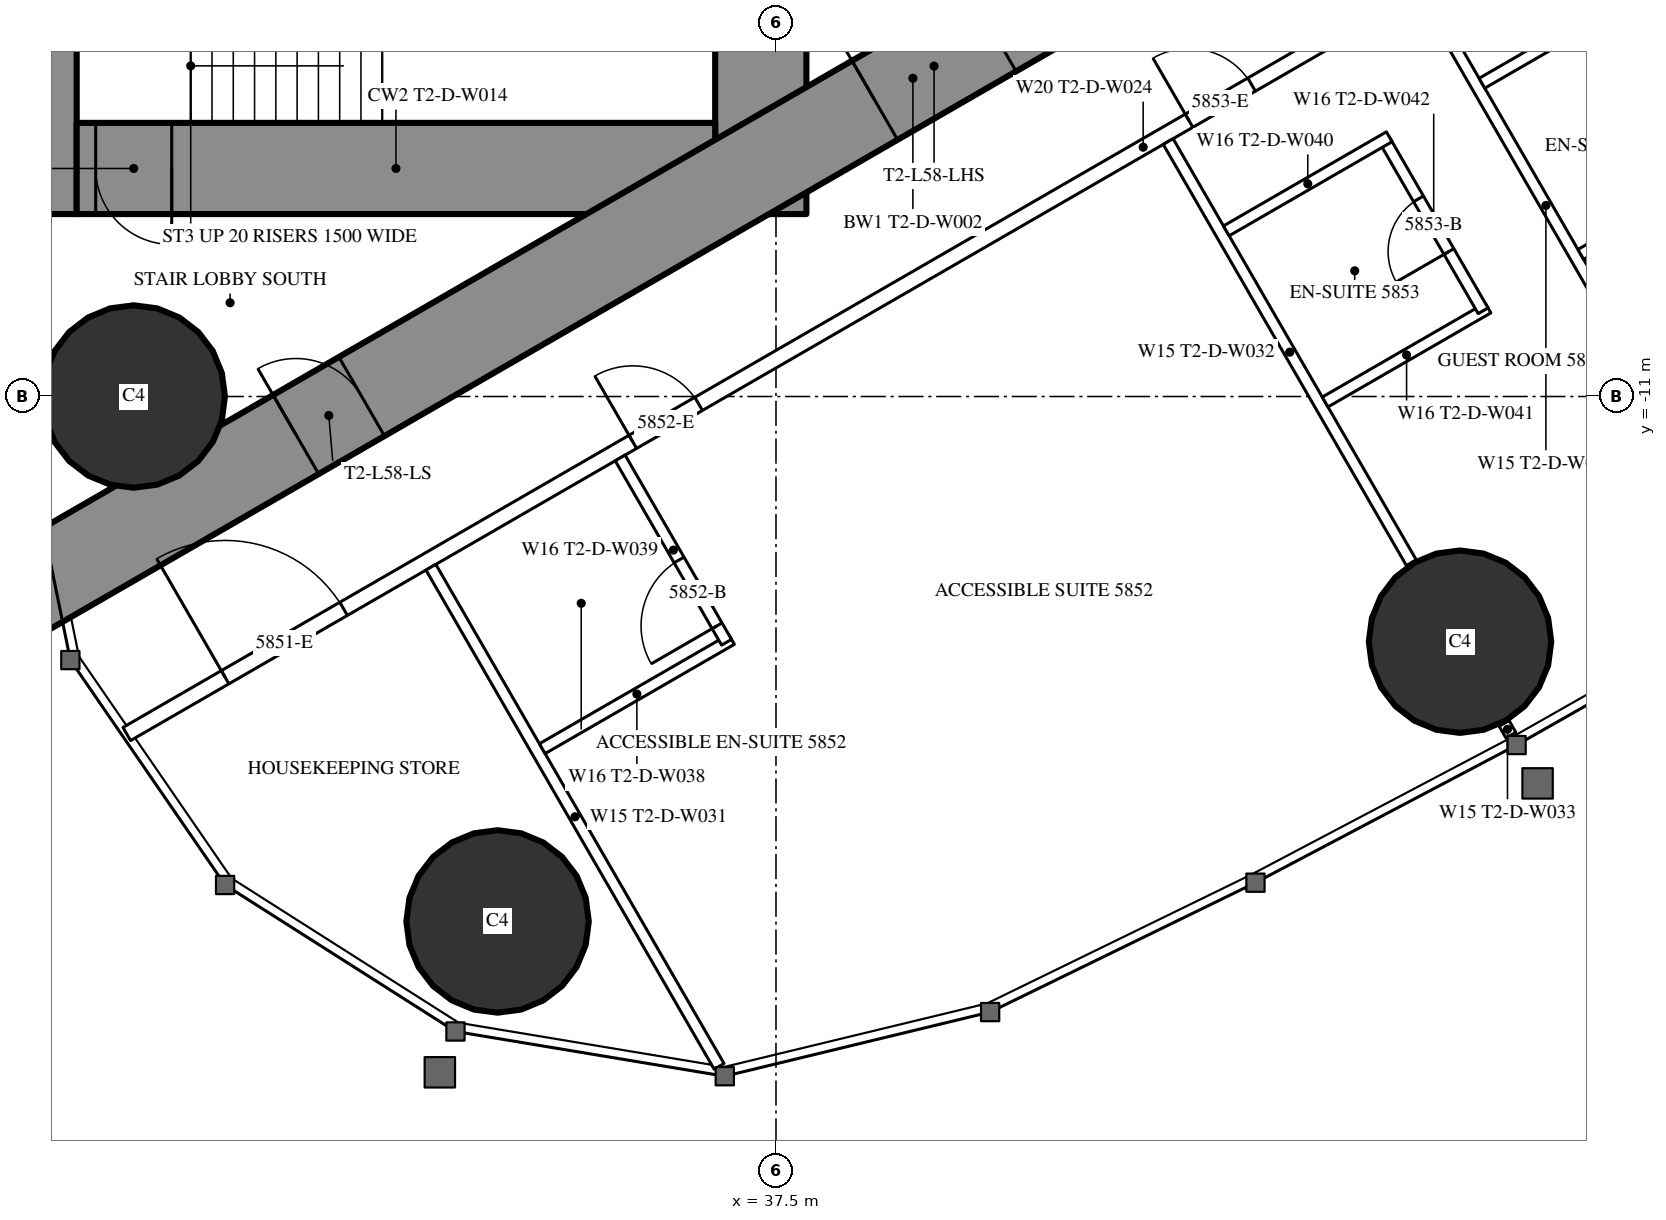
"""IFC4 building model, lengths in metres.
Left out: names, types, materials, properties, quantities, classifications, styles, units other than length and angle.
Written with IfcOpenShell. Run it as: python <this file> out.ifc"""

import sys

from ifc_helpers import new_model, si_unit, direction, frame, frame_2d, origin, origin_2d, place, context, subcontext, project, spatial, rectangle, circle, extrude, element, fill, save


model = new_model("IFC4")
c1 = context("Model", 3, precision=1e-05, world=origin(), true_north=direction((0.0, 1.0)))
c2 = subcontext(c1, "Body", "Model", "MODEL_VIEW")
j1 = project(units=[si_unit("LENGTHUNIT", "METRE"), si_unit("PLANEANGLEUNIT", "RADIAN")], contexts=[c1])
p1 = place(None, origin())
s1 = spatial("IfcSite", under=j1, at=p1, CompositionType="ELEMENT")
p2 = place(p1, origin())
s2 = spatial("IfcBuilding", under=s1, at=p2, CompositionType="ELEMENT")
p3 = place(p2, frame((0.0, 0.0, 218.9)))
s3 = spatial("IfcBuildingStorey", under=s2, at=p3, CompositionType="ELEMENT", Elevation=218.9)
for number, where, z_axis, x_axis in (
    (1, (33.837, -17.906, 0.0), (0.0, 0.0, 1.0), (1.0, 0.0, 0.0)),
    (2, (29.05, -11.0, 0.0), (0.0, 0.0, 1.0), (1.0, 0.0, 0.0)),
    (3, (46.499, -14.226, 0.0), (0.0, 0.0, 1.0), (1.0, 0.0, 0.0)),
):
    element("IfcColumn", number, at=place(p3, frame(where, z_axis=z_axis, x_axis=x_axis)), inside=s3, PredefinedType="COLUMN", context=c2, shape_type="SweptSolid", body=[
        extrude(circle(Radius=1.2, at=origin_2d()), origin(), (0.0, 0.0, 1.0), 3.6),
    ])
p4 = place(p3, frame((27.9, -8.6, 0.0), z_axis=(0.0, 0.0, 1.0), x_axis=(0.0, 1.0, 0.0)))
e4 = element("IfcWall", 4, at=p4, inside=s3, PredefinedType="SHEAR", context=c2, shape_type="SweptSolid", body=[
    extrude(rectangle(XDim=17.2, YDim=0.8, at=frame_2d((8.6, 0.0))), origin(), (0.0, 0.0, 1.0), 3.6),
])
p5 = place(p4, frame((9.35, 0.0, 0.0)))
e5 = element("IfcOpeningElement", 5, at=p5, cuts=e4, PredefinedType="OPENING", context=c2, shape_type="SweptSolid", body=[
    extrude(rectangle(XDim=0.9, YDim=2.2, at=frame_2d((0.45, 1.1))), frame((0.0, 0.41, 0.0), z_axis=(0.0, -1.0, 0.0), x_axis=(1.0, 0.0, 0.0)), (0.0, 0.0, 1.0), 0.82),
])
p6 = place(p3, frame((37.3, -8.6, 0.0), z_axis=(0.0, 0.0, 1.0), x_axis=(0.0, 1.0, 0.0)))
e6 = element("IfcWall", 6, at=p6, inside=s3, PredefinedType="SHEAR", context=c2, shape_type="SweptSolid", body=[
    extrude(rectangle(XDim=17.2, YDim=1.2, at=frame_2d((8.6, 0.0))), origin(), (0.0, 0.0, 1.0), 3.6),
])
p7 = place(p6, frame((7.7, 0.0, 0.0)))
e7 = element("IfcOpeningElement", 7, at=p7, cuts=e6, PredefinedType="OPENING", context=c2, shape_type="SweptSolid", body=[
    extrude(rectangle(XDim=1.8, YDim=2.2, at=frame_2d((0.9, 1.1))), frame((0.0, 0.61, 0.0), z_axis=(0.0, -1.0, 0.0), x_axis=(1.0, 0.0, 0.0)), (0.0, 0.0, 1.0), 1.22),
])
p8 = place(p3, frame((28.3, -8.0, 0.0), z_axis=(0.0, 0.0, 1.0), x_axis=(1.0, 0.0, 0.0)))
e8 = element("IfcWall", 8, at=p8, inside=s3, PredefinedType="SHEAR", context=c2, shape_type="SweptSolid", body=[
    extrude(rectangle(XDim=8.4, YDim=1.2, at=frame_2d((4.2, 0.0))), origin(), (0.0, 0.0, 1.0), 3.6),
])
p9 = place(p8, frame((0.25, 0.0, 0.0)))
e9 = element("IfcOpeningElement", 9, at=p9, cuts=e8, PredefinedType="OPENING", context=c2, shape_type="SweptSolid", body=[
    extrude(rectangle(XDim=1.0, YDim=2.2, at=frame_2d((0.5, 1.1))), frame((0.0, 0.61, 0.0), z_axis=(0.0, -1.0, 0.0), x_axis=(1.0, 0.0, 0.0)), (0.0, 0.0, 1.0), 1.22),
])
p10 = place(p3, frame((27.2, -13.8, 0.0), z_axis=(0.0, 0.0, 1.0), x_axis=(0.866027159892, 0.499996958321, 0.0)))
e10 = element("IfcWall", 10, at=p10, inside=s3, PredefinedType="SHEAR", context=c2, shape_type="SweptSolid", body=[
    extrude(rectangle(XDim=27.947, YDim=1.2, at=frame_2d((13.973, 0.0))), origin(), (0.0, 0.0, 1.0), 3.6),
])
p11 = place(p10, frame((4.6, 0.0, 0.0)))
e11 = element("IfcOpeningElement", 11, at=p11, cuts=e10, PredefinedType="OPENING", context=c2, shape_type="SweptSolid", body=[
    extrude(rectangle(XDim=1.0, YDim=2.2, at=frame_2d((0.5, 1.1))), frame((0.0, 0.61, 0.0), z_axis=(0.0, -1.0, 0.0), x_axis=(1.0, 0.0, 0.0)), (0.0, 0.0, 1.0), 1.22),
])
p12 = place(p10, frame((13.395, 0.0, 0.0)))
e12 = element("IfcOpeningElement", 12, at=p12, cuts=e10, PredefinedType="OPENING", context=c2, shape_type="SweptSolid", body=[
    extrude(rectangle(XDim=1.8, YDim=2.2, at=frame_2d((0.9, 1.1))), frame((0.0, 0.61, 0.0), z_axis=(0.0, -1.0, 0.0), x_axis=(1.0, 0.0, 0.0)), (0.0, 0.0, 1.0), 1.22),
])
p13 = place(p3, frame((28.959, -15.44, 0.0), z_axis=(0.0, 0.0, 1.0), x_axis=(0.866025227435, 0.500000305447, 0.0)))
e13 = element("IfcWall", 13, at=p13, inside=s3, PredefinedType="PARTITIONING", context=c2, shape_type="SweptSolid", body=[
    extrude(rectangle(XDim=30.88, YDim=0.2, at=frame_2d((15.44, 0.0))), origin(), (0.0, 0.0, 1.0), 3.35),
])
p14 = place(p13, frame((1.494, 0.0, 0.0)))
e14 = element("IfcOpeningElement", 14, at=p14, cuts=e13, PredefinedType="OPENING", context=c2, shape_type="SweptSolid", body=[
    extrude(rectangle(XDim=1.8, YDim=2.03, at=frame_2d((0.9, 1.015))), frame((0.0, 0.11, 0.0), z_axis=(0.0, -1.0, 0.0), x_axis=(1.0, 0.0, 0.0)), (0.0, 0.0, 1.0), 0.22),
])
p15 = place(p13, frame((7.687, 0.0, 0.0)))
e15 = element("IfcOpeningElement", 15, at=p15, cuts=e13, PredefinedType="OPENING", context=c2, shape_type="SweptSolid", body=[
    extrude(rectangle(XDim=1.0, YDim=2.2, at=frame_2d((0.5, 1.1))), frame((0.0, 0.11, 0.0), z_axis=(0.0, -1.0, 0.0), x_axis=(1.0, 0.0, 0.0)), (0.0, 0.0, 1.0), 0.22),
])
p16 = place(p13, frame((16.137, 0.0, 0.0)))
e16 = element("IfcOpeningElement", 16, at=p16, cuts=e13, PredefinedType="OPENING", context=c2, shape_type="SweptSolid", body=[
    extrude(rectangle(XDim=0.95, YDim=2.2, at=frame_2d((0.475, 1.1))), frame((0.0, 0.11, 0.0), z_axis=(0.0, -1.0, 0.0), x_axis=(1.0, 0.0, 0.0)), (0.0, 0.0, 1.0), 0.22),
])
p17 = place(p13, frame((20.021, 0.0, 0.0)))
e17 = element("IfcOpeningElement", 17, at=p17, cuts=e13, PredefinedType="OPENING", context=c2, shape_type="SweptSolid", body=[
    extrude(rectangle(XDim=0.95, YDim=2.2, at=frame_2d((0.475, 1.1))), frame((0.0, 0.11, 0.0), z_axis=(0.0, -1.0, 0.0), x_axis=(1.0, 0.0, 0.0)), (0.0, 0.0, 1.0), 0.22),
])
p18 = place(p13, frame((26.253, 0.0, 0.0)))
e18 = element("IfcOpeningElement", 18, at=p18, cuts=e13, PredefinedType="OPENING", context=c2, shape_type="SweptSolid", body=[
    extrude(rectangle(XDim=0.95, YDim=2.2, at=frame_2d((0.475, 1.1))), frame((0.0, 0.11, 0.0), z_axis=(0.0, -1.0, 0.0), x_axis=(1.0, 0.0, 0.0)), (0.0, 0.0, 1.0), 0.22),
])
p19 = place(p3, frame((32.96, -13.246, 0.0), z_axis=(0.0, 0.0, 1.0), x_axis=(0.500000236886, -0.866025267018, 0.0)))
e19 = element("IfcWall", 19, at=p19, inside=s3, PredefinedType="PARTITIONING", context=c2, shape_type="SweptSolid", body=[
    extrude(rectangle(XDim=7.583, YDim=0.15, at=frame_2d((3.791, 0.0))), origin(), (0.0, 0.0, 1.0), 3.35),
])
p20 = place(p3, frame((42.66, -7.646, 0.0), z_axis=(0.0, 0.0, 1.0), x_axis=(0.499996592859, -0.866027370889, 0.0)))
e20 = element("IfcWall", 20, at=p20, inside=s3, PredefinedType="PARTITIONING", context=c2, shape_type="SweptSolid", body=[
    extrude(rectangle(XDim=6.398, YDim=0.15, at=frame_2d((3.199, 0.0))), origin(), (0.0, 0.0, 1.0), 2.45),
])
p21 = place(p3, frame((47.079, -15.3, 0.0), z_axis=(0.0, 0.0, 1.0), x_axis=(0.499212083968, -0.866479829667, 0.0)))
e21 = element("IfcWall", 21, at=p21, inside=s3, PredefinedType="PARTITIONING", context=c2, shape_type="SweptSolid", body=[
    extrude(rectangle(XDim=0.179, YDim=0.15, at=frame_2d((0.09, 0.0))), origin(), (0.0, 0.0, 1.0), 2.45),
])
p22 = place(p3, frame((46.023, -5.704, 0.0), z_axis=(0.0, 0.0, 1.0), x_axis=(0.499984478165, -0.866034365135, 0.0)))
e22 = element("IfcWall", 22, at=p22, inside=s3, PredefinedType="PARTITIONING", context=c2, shape_type="SweptSolid", body=[
    extrude(rectangle(XDim=6.426, YDim=0.15, at=frame_2d((3.213, 0.0))), origin(), (0.0, 0.0, 1.0), 2.45),
])
p23 = place(p3, frame((34.425, -15.633, 0.0), z_axis=(0.0, 0.0, 1.0), x_axis=(0.866018712932, 0.500011588718, 0.0)))
e23 = element("IfcWall", 23, at=p23, inside=s3, PredefinedType="PARTITIONING", context=c2, shape_type="SweptSolid", body=[
    extrude(rectangle(XDim=2.875, YDim=0.15, at=frame_2d((1.438, 0.0))), origin(), (0.0, 0.0, 1.0), 3.35),
])
p24 = place(p3, frame((35.45, -11.808, 0.0), z_axis=(0.0, 0.0, 1.0), x_axis=(0.49994636267, -0.866056369097, 0.0)))
e24 = element("IfcWall", 24, at=p24, inside=s3, PredefinedType="PARTITIONING", context=c2, shape_type="SweptSolid", body=[
    extrude(rectangle(XDim=2.8, YDim=0.15, at=frame_2d((1.4, 0.0))), origin(), (0.0, 0.0, 1.0), 3.35),
])
p25 = place(p24, frame((1.55, 0.0, 0.0)))
e25 = element("IfcOpeningElement", 25, at=p25, cuts=e24, PredefinedType="OPENING", context=c2, shape_type="SweptSolid", body=[
    extrude(rectangle(XDim=1.0, YDim=2.2, at=frame_2d((0.5, 1.1))), frame((0.0, 0.085, 0.0), z_axis=(0.0, -1.0, 0.0), x_axis=(1.0, 0.0, 0.0)), (0.0, 0.0, 1.0), 0.17),
])
p26 = place(p3, frame((44.725, -11.072, 0.0), z_axis=(0.0, 0.0, 1.0), x_axis=(0.866006523861, 0.500032699561, 0.0)))
e26 = element("IfcWall", 26, at=p26, inside=s3, PredefinedType="PARTITIONING", context=c2, shape_type="SweptSolid", body=[
    extrude(rectangle(XDim=2.475, YDim=0.15, at=frame_2d((1.237, 0.0))), origin(), (0.0, 0.0, 1.0), 3.35),
])
p27 = place(p3, frame((45.503, -7.621, 0.0), z_axis=(0.0, 0.0, 1.0), x_axis=(0.500006934395, -0.866021400173, 0.0)))
e27 = element("IfcWall", 27, at=p27, inside=s3, PredefinedType="PARTITIONING", context=c2, shape_type="SweptSolid", body=[
    extrude(rectangle(XDim=2.6, YDim=0.15, at=frame_2d((1.3, 0.0))), origin(), (0.0, 0.0, 1.0), 3.35),
])
p28 = place(p27, frame((0.9, 0.0, 0.0)))
e28 = element("IfcOpeningElement", 28, at=p28, cuts=e27, PredefinedType="OPENING", context=c2, shape_type="SweptSolid", body=[
    extrude(rectangle(XDim=0.8, YDim=2.2, at=frame_2d((0.4, 1.1))), frame((0.0, 0.085, 0.0), z_axis=(0.0, -1.0, 0.0), x_axis=(1.0, 0.0, 0.0)), (0.0, 0.0, 1.0), 0.17),
])
for number, where, z_axis, x_axis in (
    (29, (43.425, -8.821, 0.0), (0.0, 0.0, 1.0), (0.866, 0.5, 0.0)),
    (30, (48.088, -9.13, 0.0), (0.0, 0.0, 1.0), (0.866, 0.5, 0.0)),
    (31, (46.788, -6.879, 0.0), (0.0, 0.0, 1.0), (0.866, 0.5, 0.0)),
):
    element("IfcWall", number, at=place(p3, frame(where, z_axis=z_axis, x_axis=x_axis)), inside=s3, PredefinedType="PARTITIONING", context=c2, shape_type="SweptSolid", body=[
        extrude(rectangle(XDim=2.475, YDim=0.15, at=frame_2d((1.237, 0.0))), origin(), (0.0, 0.0, 1.0), 3.35),
    ])
p29 = place(p14, origin())
e32 = element("IfcDoor", 32, at=p29, inside=s3, OperationType="DOUBLE_DOOR_SINGLE_SWING", PredefinedType="DOOR", context=c2, shape_type="SweptSolid", body=[
    extrude(rectangle(XDim=1.8, YDim=2.03, at=frame_2d((0.9, 1.015))), frame((0.0, 0.025, 0.0), z_axis=(0.0, -1.0, 0.0), x_axis=(1.0, 0.0, 0.0)), (0.0, 0.0, 1.0), 0.05),
])
fill(e14, e32)
p30 = place(p25, origin())
e33 = element("IfcDoor", 33, at=p30, inside=s3, OperationType="SINGLE_SWING_RIGHT", PredefinedType="DOOR", context=c2, shape_type="SweptSolid", body=[
    extrude(rectangle(XDim=1.0, YDim=2.2, at=frame_2d((0.5, 1.1))), frame((0.0, 0.025, 0.0), z_axis=(0.0, -1.0, 0.0), x_axis=(1.0, 0.0, 0.0)), (0.0, 0.0, 1.0), 0.05),
])
fill(e25, e33)
p31 = place(p15, origin())
e34 = element("IfcDoor", 34, at=p31, inside=s3, OperationType="SINGLE_SWING_LEFT", PredefinedType="DOOR", context=c2, shape_type="SweptSolid", body=[
    extrude(rectangle(XDim=1.0, YDim=2.2, at=frame_2d((0.5, 1.1))), frame((0.0, 0.025, 0.0), z_axis=(0.0, -1.0, 0.0), x_axis=(1.0, 0.0, 0.0)), (0.0, 0.0, 1.0), 0.05),
])
fill(e15, e34)
p32 = place(p28, origin())
e35 = element("IfcDoor", 35, at=p32, inside=s3, OperationType="SINGLE_SWING_RIGHT", PredefinedType="DOOR", context=c2, shape_type="SweptSolid", body=[
    extrude(rectangle(XDim=0.8, YDim=2.2, at=frame_2d((0.4, 1.1))), frame((0.0, 0.025, 0.0), z_axis=(0.0, -1.0, 0.0), x_axis=(1.0, 0.0, 0.0)), (0.0, 0.0, 1.0), 0.05),
])
fill(e28, e35)
p33 = place(p16, origin())
e36 = element("IfcDoor", 36, at=p33, inside=s3, OperationType="SINGLE_SWING_LEFT", PredefinedType="DOOR", context=c2, shape_type="SweptSolid", body=[
    extrude(rectangle(XDim=0.95, YDim=2.2, at=frame_2d((0.475, 1.1))), frame((0.0, 0.025, 0.0), z_axis=(0.0, -1.0, 0.0), x_axis=(1.0, 0.0, 0.0)), (0.0, 0.0, 1.0), 0.05),
])
fill(e16, e36)
p34 = place(p11, origin())
e37 = element("IfcDoor", 37, at=p34, inside=s3, OperationType="SINGLE_SWING_LEFT", PredefinedType="DOOR", context=c2, shape_type="SweptSolid", body=[
    extrude(rectangle(XDim=1.0, YDim=2.2, at=frame_2d((0.5, 1.1))), frame((0.0, 0.025, 0.0), z_axis=(0.0, -1.0, 0.0), x_axis=(1.0, 0.0, 0.0)), (0.0, 0.0, 1.0), 0.05),
])
fill(e11, e37)
p35 = place(p12, origin())
e38 = element("IfcDoor", 38, at=p35, inside=s3, OperationType="DOUBLE_DOOR_SINGLE_SWING", PredefinedType="DOOR", context=c2, shape_type="SweptSolid", body=[
    extrude(rectangle(XDim=1.8, YDim=2.2, at=frame_2d((0.9, 1.1))), frame((0.0, 0.025, 0.0), z_axis=(0.0, -1.0, 0.0), x_axis=(1.0, 0.0, 0.0)), (0.0, 0.0, 1.0), 0.05),
])
fill(e12, e38)
p36 = place(p9, origin())
e39 = element("IfcDoor", 39, at=p36, inside=s3, OperationType="SINGLE_SWING_RIGHT", PredefinedType="DOOR", context=c2, shape_type="SweptSolid", body=[
    extrude(rectangle(XDim=1.0, YDim=2.2, at=frame_2d((0.5, 1.1))), frame((0.0, 0.025, 0.0), z_axis=(0.0, -1.0, 0.0), x_axis=(1.0, 0.0, 0.0)), (0.0, 0.0, 1.0), 0.05),
])
fill(e9, e39)
save(model, sys.argv[1])
